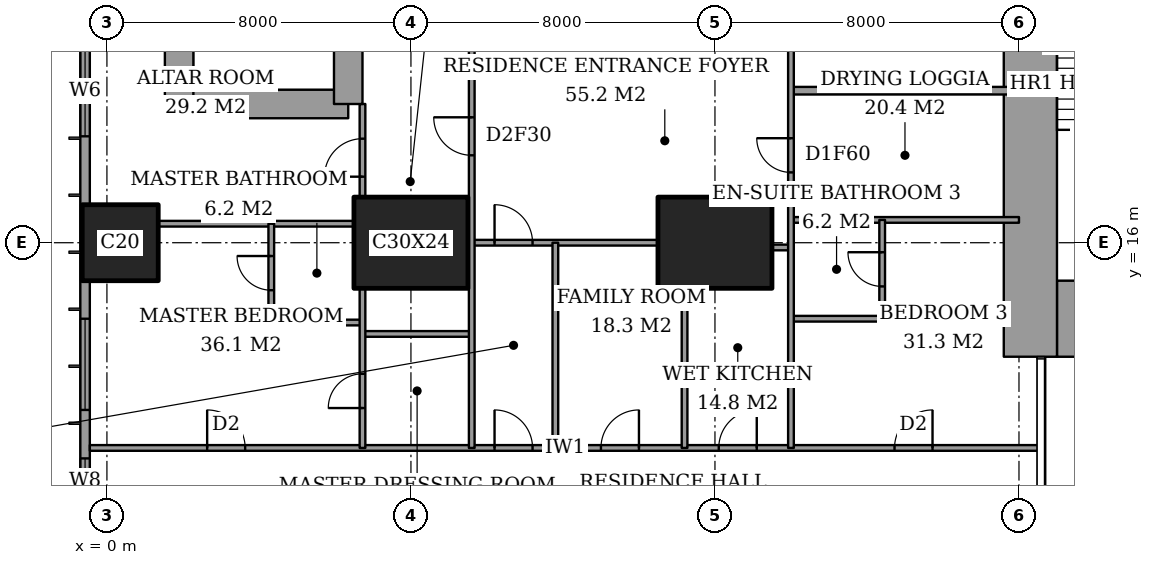
"""IFC4 building model, lengths in metres.
Left out: names, types, materials, properties, quantities, classifications, styles, units other than length and angle.
Written with IfcOpenShell. Run it as: python <this file> out.ifc"""

import sys

from ifc_helpers import new_model, si_unit, direction, frame, frame_2d, origin, origin_2d, place, context, subcontext, project, spatial, rectangle, extrude, element, fill, save


model = new_model("IFC4")
c1 = context("Model", 3, precision=1e-05, world=origin(), true_north=direction((0.0, 1.0)))
c2 = subcontext(c1, "Body", "Model", "MODEL_VIEW")
j1 = project(units=[si_unit("LENGTHUNIT", "METRE"), si_unit("PLANEANGLEUNIT", "RADIAN")], contexts=[c1])
p1 = place(None, origin())
s1 = spatial("IfcSite", under=j1, at=p1, CompositionType="ELEMENT")
p2 = place(p1, origin())
s2 = spatial("IfcBuilding", under=s1, at=p2, CompositionType="ELEMENT")
p3 = place(p2, frame((0.0, 0.0, 83.6)))
s3 = spatial("IfcBuildingStorey", under=s2, at=p3, CompositionType="ELEMENT", Elevation=83.6)
p4 = place(p3, frame((0.35, 16.0, 0.0), z_axis=(0.0, 0.0, 1.0), x_axis=(1.0, 0.0, 0.0)))
e1 = element("IfcColumn", 1, at=p4, inside=s3, PredefinedType="COLUMN", context=c2, shape_type="SweptSolid", body=[
    extrude(rectangle(XDim=2.0, YDim=2.0, at=origin_2d()), origin(), (0.0, 0.0, 1.0), 3.6),
])
for number, where, z_axis, x_axis in (
    (2, (8.0, 16.0, 0.0), (0.0, 0.0, 1.0), (1.0, 0.0, 0.0)),
    (3, (16.0, 16.0, 0.0), (0.0, 0.0, 1.0), (1.0, 0.0, 0.0)),
):
    element("IfcColumn", number, at=place(p3, frame(where, z_axis=z_axis, x_axis=x_axis)), inside=s3, PredefinedType="COLUMN", context=c2, shape_type="SweptSolid", body=[
        extrude(rectangle(XDim=3.0, YDim=2.4, at=origin_2d()), origin(), (0.0, 0.0, 1.0), 3.6),
    ])
p5 = place(p3, frame((25.0, 14.0, 0.0), z_axis=(0.0, 0.0, 1.0), x_axis=(1.0, 0.0, 0.0)))
e4 = element("IfcWall", 4, at=p5, inside=s3, PredefinedType="SHEAR", context=c2, shape_type="SweptSolid", body=[
    extrude(rectangle(XDim=3.15, YDim=2.0, at=frame_2d((1.575, 0.0))), origin(), (0.0, 0.0, 1.0), 3.6),
])
p6 = place(p3, frame((24.3, 13.0, 0.0), z_axis=(0.0, 0.0, 1.0), x_axis=(0.0, 1.0, 0.0)))
e5 = element("IfcWall", 5, at=p6, inside=s3, PredefinedType="SHEAR", context=c2, shape_type="SweptSolid", body=[
    extrude(rectangle(XDim=10.15, YDim=1.4, at=frame_2d((5.075, 0.0))), origin(), (0.0, 0.0, 1.0), 3.6),
])
p7 = place(p3, frame((1.9, 19.65, 0.0), z_axis=(0.0, 0.0, 1.0), x_axis=(1.0, 0.0, 0.0)))
e6 = element("IfcWall", 6, at=p7, inside=s3, PredefinedType="SHEAR", context=c2, shape_type="SweptSolid", body=[
    extrude(rectangle(XDim=4.45, YDim=0.75, at=frame_2d((2.225, 0.0))), origin(), (0.0, 0.0, 1.0), 3.6),
])
p8 = place(p3, frame((6.35, 19.65, 0.0), z_axis=(0.0, 0.0, 1.0), x_axis=(0.0, 1.0, 0.0)))
e7 = element("IfcWall", 7, at=p8, inside=s3, PredefinedType="SHEAR", context=c2, shape_type="SweptSolid", body=[
    extrude(rectangle(XDim=8.7, YDim=0.75, at=frame_2d((4.35, 0.0))), origin(), (0.0, 0.0, 1.0), 3.6),
])
p9 = place(p8, frame((6.725, 0.0, 0.0)))
e8 = element("IfcOpeningElement", 8, at=p9, cuts=e7, PredefinedType="OPENING", context=c2, shape_type="SweptSolid", body=[
    extrude(rectangle(XDim=1.0, YDim=2.1, at=frame_2d((0.5, 1.05))), frame((0.0, 0.385, 0.0), z_axis=(0.0, -1.0, 0.0), x_axis=(1.0, 0.0, 0.0)), (0.0, 0.0, 1.0), 0.77),
])
p10 = place(p3, frame((1.9, 28.35, 0.0), z_axis=(0.0, 0.0, 1.0), x_axis=(0.0, -1.0, 0.0)))
e9 = element("IfcWall", 9, at=p10, inside=s3, PredefinedType="SHEAR", context=c2, shape_type="SweptSolid", body=[
    extrude(rectangle(XDim=8.7, YDim=0.75, at=frame_2d((4.35, 0.0))), origin(), (0.0, 0.0, 1.0), 3.6),
])
p11 = place(p3, frame((-0.575, 44.825, 0.0), z_axis=(0.0, 0.0, 1.0), x_axis=(0.0, -1.0, 0.0)))
e10 = element("IfcWall", 10, at=p11, inside=s3, PredefinedType="SOLIDWALL", context=c2, shape_type="SweptSolid", body=[
    extrude(rectangle(XDim=41.65, YDim=0.25, at=frame_2d((20.825, 0.0))), origin(), (0.0, 0.0, 1.0), 3.6),
])
p12 = place(p11, frame((0.775, 0.0, 0.6)))
e11 = element("IfcOpeningElement", 11, at=p12, cuts=e10, PredefinedType="OPENING", context=c2, shape_type="SweptSolid", body=[
    extrude(rectangle(XDim=2.4, YDim=2.0, at=frame_2d((1.2, 1.0))), frame((0.0, 0.135, 0.0), z_axis=(0.0, -1.0, 0.0), x_axis=(1.0, 0.0, 0.0)), (0.0, 0.0, 1.0), 0.27),
])
p13 = place(p11, frame((6.1, 0.0, 0.6)))
e12 = element("IfcOpeningElement", 12, at=p13, cuts=e10, PredefinedType="OPENING", context=c2, shape_type="SweptSolid", body=[
    extrude(rectangle(XDim=1.2, YDim=2.0, at=frame_2d((0.6, 1.0))), frame((0.0, 0.135, 0.0), z_axis=(0.0, -1.0, 0.0), x_axis=(1.0, 0.0, 0.0)), (0.0, 0.0, 1.0), 0.27),
])
p14 = place(p11, frame((8.425, 0.0, 0.6)))
e13 = element("IfcOpeningElement", 13, at=p14, cuts=e10, PredefinedType="OPENING", context=c2, shape_type="SweptSolid", body=[
    extrude(rectangle(XDim=2.4, YDim=2.0, at=frame_2d((1.2, 1.0))), frame((0.0, 0.135, 0.0), z_axis=(0.0, -1.0, 0.0), x_axis=(1.0, 0.0, 0.0)), (0.0, 0.0, 1.0), 0.27),
])
p15 = place(p11, frame((15.625, 0.0, 0.6)))
e14 = element("IfcOpeningElement", 14, at=p15, cuts=e10, PredefinedType="OPENING", context=c2, shape_type="SweptSolid", body=[
    extrude(rectangle(XDim=2.4, YDim=2.0, at=frame_2d((1.2, 1.0))), frame((0.0, 0.135, 0.0), z_axis=(0.0, -1.0, 0.0), x_axis=(1.0, 0.0, 0.0)), (0.0, 0.0, 1.0), 0.27),
])
p16 = place(p11, frame((23.625, 0.0, 0.6)))
e15 = element("IfcOpeningElement", 15, at=p16, cuts=e10, PredefinedType="OPENING", context=c2, shape_type="SweptSolid", body=[
    extrude(rectangle(XDim=2.4, YDim=2.0, at=frame_2d((1.2, 1.0))), frame((0.0, 0.135, 0.0), z_axis=(0.0, -1.0, 0.0), x_axis=(1.0, 0.0, 0.0)), (0.0, 0.0, 1.0), 0.27),
])
p17 = place(p11, frame((30.825, 0.0, 0.6)))
e16 = element("IfcOpeningElement", 16, at=p17, cuts=e10, PredefinedType="OPENING", context=c2, shape_type="SweptSolid", body=[
    extrude(rectangle(XDim=2.4, YDim=2.0, at=frame_2d((1.2, 1.0))), frame((0.0, 0.135, 0.0), z_axis=(0.0, -1.0, 0.0), x_axis=(1.0, 0.0, 0.0)), (0.0, 0.0, 1.0), 0.27),
])
p18 = place(p11, frame((34.5, 0.0, 0.6)))
e17 = element("IfcOpeningElement", 17, at=p18, cuts=e10, PredefinedType="OPENING", context=c2, shape_type="SweptSolid", body=[
    extrude(rectangle(XDim=1.2, YDim=2.0, at=frame_2d((0.6, 1.0))), frame((0.0, 0.135, 0.0), z_axis=(0.0, -1.0, 0.0), x_axis=(1.0, 0.0, 0.0)), (0.0, 0.0, 1.0), 0.27),
])
p19 = place(p11, frame((38.475, 0.0, 0.6)))
e18 = element("IfcOpeningElement", 18, at=p19, cuts=e10, PredefinedType="OPENING", context=c2, shape_type="SweptSolid", body=[
    extrude(rectangle(XDim=2.4, YDim=2.0, at=frame_2d((1.2, 1.0))), frame((0.0, 0.135, 0.0), z_axis=(0.0, -1.0, 0.0), x_axis=(1.0, 0.0, 0.0)), (0.0, 0.0, 1.0), 0.27),
])
p20 = place(p3, frame((-0.45, 10.6, 0.0), z_axis=(0.0, 0.0, 1.0), x_axis=(1.0, 0.0, 0.0)))
e19 = element("IfcWall", 19, at=p20, inside=s3, PredefinedType="PARTITIONING", context=c2, shape_type="SweptSolid", body=[
    extrude(rectangle(XDim=25.011, YDim=0.15, at=frame_2d((12.505, 0.0))), origin(), (0.0, 0.0, 1.0), 3.35),
])
p21 = place(p20, frame((10.65, 0.0, 0.0)))
e20 = element("IfcOpeningElement", 20, at=p21, cuts=e19, PredefinedType="OPENING", context=c2, shape_type="SweptSolid", body=[
    extrude(rectangle(XDim=1.0, YDim=2.1, at=frame_2d((0.5, 1.05))), frame((0.0, 0.085, 0.0), z_axis=(0.0, -1.0, 0.0), x_axis=(1.0, 0.0, 0.0)), (0.0, 0.0, 1.0), 0.17),
])
p22 = place(p20, frame((3.087, 0.0, 0.0)))
e21 = element("IfcOpeningElement", 21, at=p22, cuts=e19, PredefinedType="OPENING", context=c2, shape_type="SweptSolid", body=[
    extrude(rectangle(XDim=1.0, YDim=2.1, at=frame_2d((0.5, 1.05))), frame((0.0, 0.085, 0.0), z_axis=(0.0, -1.0, 0.0), x_axis=(1.0, 0.0, 0.0)), (0.0, 0.0, 1.0), 0.17),
])
p23 = place(p20, frame((13.45, 0.0, 0.0)))
e22 = element("IfcOpeningElement", 22, at=p23, cuts=e19, PredefinedType="OPENING", context=c2, shape_type="SweptSolid", body=[
    extrude(rectangle(XDim=1.0, YDim=2.1, at=frame_2d((0.5, 1.05))), frame((0.0, 0.085, 0.0), z_axis=(0.0, -1.0, 0.0), x_axis=(1.0, 0.0, 0.0)), (0.0, 0.0, 1.0), 0.17),
])
p24 = place(p20, frame((16.55, 0.0, 0.0)))
e23 = element("IfcOpeningElement", 23, at=p24, cuts=e19, PredefinedType="OPENING", context=c2, shape_type="SweptSolid", body=[
    extrude(rectangle(XDim=1.0, YDim=2.1, at=frame_2d((0.5, 1.05))), frame((0.0, 0.085, 0.0), z_axis=(0.0, -1.0, 0.0), x_axis=(1.0, 0.0, 0.0)), (0.0, 0.0, 1.0), 0.17),
])
p25 = place(p20, frame((21.175, 0.0, 0.0)))
e24 = element("IfcOpeningElement", 24, at=p25, cuts=e19, PredefinedType="OPENING", context=c2, shape_type="SweptSolid", body=[
    extrude(rectangle(XDim=1.0, YDim=2.1, at=frame_2d((0.5, 1.05))), frame((0.0, 0.085, 0.0), z_axis=(0.0, -1.0, 0.0), x_axis=(1.0, 0.0, 0.0)), (0.0, 0.0, 1.0), 0.17),
])
p26 = place(p3, frame((6.725, 13.6, 0.0), z_axis=(0.0, 0.0, 1.0), x_axis=(1.0, 0.0, 0.0)))
e25 = element("IfcWall", 25, at=p26, inside=s3, PredefinedType="PARTITIONING", context=c2, shape_type="SweptSolid", body=[
    extrude(rectangle(XDim=2.875, YDim=0.15, at=frame_2d((1.438, 0.0))), origin(), (0.0, 0.0, 1.0), 3.35),
])
p27 = place(p3, frame((4.325, 13.9, 0.0), z_axis=(0.0, 0.0, 1.0), x_axis=(1.0, 0.0, 0.0)))
e26 = element("IfcWall", 26, at=p27, inside=s3, PredefinedType="PARTITIONING", context=c2, shape_type="SweptSolid", body=[
    extrude(rectangle(XDim=2.4, YDim=0.15, at=frame_2d((1.2, 0.0))), origin(), (0.0, 0.0, 1.0), 3.35),
])
p28 = place(p3, frame((18.0, 14.0, 0.0), z_axis=(0.0, 0.0, 1.0), x_axis=(1.0, 0.0, 0.0)))
e27 = element("IfcWall", 27, at=p28, inside=s3, PredefinedType="PARTITIONING", context=c2, shape_type="SweptSolid", body=[
    extrude(rectangle(XDim=2.4, YDim=0.15, at=frame_2d((1.2, 0.0))), origin(), (0.0, 0.0, 1.0), 3.35),
])
p29 = place(p3, frame((17.5, 15.875, 0.0), z_axis=(0.0, 0.0, 1.0), x_axis=(1.0, 0.0, 0.0)))
e28 = element("IfcWall", 28, at=p29, inside=s3, PredefinedType="PARTITIONING", context=c2, shape_type="SweptSolid", body=[
    extrude(rectangle(XDim=0.5, YDim=0.15, at=frame_2d((0.25, 0.0))), origin(), (0.0, 0.0, 1.0), 2.634),
])
p30 = place(p3, frame((9.6, 16.0, 0.0), z_axis=(0.0, 0.0, 1.0), x_axis=(1.0, 0.0, 0.0)))
e29 = element("IfcWall", 29, at=p30, inside=s3, PredefinedType="PARTITIONING", context=c2, shape_type="SweptSolid", body=[
    extrude(rectangle(XDim=4.9, YDim=0.15, at=frame_2d((2.45, 0.0))), origin(), (0.0, 0.0, 1.0), 2.634),
])
p31 = place(p30, frame((0.6, 0.0, 0.0)))
e30 = element("IfcOpeningElement", 30, at=p31, cuts=e29, PredefinedType="OPENING", context=c2, shape_type="SweptSolid", body=[
    extrude(rectangle(XDim=1.0, YDim=2.1, at=frame_2d((0.5, 1.05))), frame((0.0, 0.085, 0.0), z_axis=(0.0, -1.0, 0.0), x_axis=(1.0, 0.0, 0.0)), (0.0, 0.0, 1.0), 0.17),
])
p32 = place(p3, frame((1.35, 16.5, 0.0), z_axis=(0.0, 0.0, 1.0), x_axis=(1.0, 0.0, 0.0)))
e31 = element("IfcWall", 31, at=p32, inside=s3, PredefinedType="PARTITIONING", context=c2, shape_type="SweptSolid", body=[
    extrude(rectangle(XDim=5.15, YDim=0.15, at=frame_2d((2.575, 0.0))), origin(), (0.0, 0.0, 1.0), 3.35),
])
p33 = place(p3, frame((18.0, 16.6, 0.0), z_axis=(0.0, 0.0, 1.0), x_axis=(1.0, 0.0, 0.0)))
e32 = element("IfcWall", 32, at=p33, inside=s3, PredefinedType="PARTITIONING", context=c2, shape_type="SweptSolid", body=[
    extrude(rectangle(XDim=6.0, YDim=0.15, at=frame_2d((3.0, 0.0))), origin(), (0.0, 0.0, 1.0), 3.35),
])
p34 = place(p3, frame((18.0, 20.0, 0.0), z_axis=(0.0, 0.0, 1.0), x_axis=(1.0, 0.0, 0.0)))
e33 = element("IfcWall", 33, at=p34, inside=s3, PredefinedType="PARTITIONING", context=c2, shape_type="SweptSolid", body=[
    extrude(rectangle(XDim=6.0, YDim=0.2, at=frame_2d((3.0, 0.0))), origin(), (0.0, 0.0, 1.0), 3.35),
])
p35 = place(p3, frame((4.325, 13.9, 0.0), z_axis=(0.0, 0.0, 1.0), x_axis=(0.0, 1.0, 0.0)))
e34 = element("IfcWall", 34, at=p35, inside=s3, PredefinedType="PARTITIONING", context=c2, shape_type="SweptSolid", body=[
    extrude(rectangle(XDim=2.6, YDim=0.15, at=frame_2d((1.3, 0.0))), origin(), (0.0, 0.0, 1.0), 3.35),
])
p36 = place(p35, frame((0.85, 0.0, 0.0)))
e35 = element("IfcOpeningElement", 35, at=p36, cuts=e34, PredefinedType="OPENING", context=c2, shape_type="SweptSolid", body=[
    extrude(rectangle(XDim=0.9, YDim=2.1, at=frame_2d((0.45, 1.05))), frame((0.0, 0.085, 0.0), z_axis=(0.0, -1.0, 0.0), x_axis=(1.0, 0.0, 0.0)), (0.0, 0.0, 1.0), 0.17),
])
p37 = place(p3, frame((6.725, 10.6, 0.0), z_axis=(0.0, 0.0, 1.0), x_axis=(0.0, 1.0, 0.0)))
e36 = element("IfcWall", 36, at=p37, inside=s3, PredefinedType="PARTITIONING", context=c2, shape_type="SweptSolid", body=[
    extrude(rectangle(XDim=4.2, YDim=0.15, at=frame_2d((2.1, 0.0))), origin(), (0.0, 0.0, 1.0), 3.35),
])
p38 = place(p37, frame((1.05, 0.0, 0.0)))
e37 = element("IfcOpeningElement", 37, at=p38, cuts=e36, PredefinedType="OPENING", context=c2, shape_type="SweptSolid", body=[
    extrude(rectangle(XDim=0.9, YDim=2.1, at=frame_2d((0.45, 1.05))), frame((0.0, 0.085, 0.0), z_axis=(0.0, -1.0, 0.0), x_axis=(1.0, 0.0, 0.0)), (0.0, 0.0, 1.0), 0.17),
])
p39 = place(p3, frame((6.725, 17.2, 0.0), z_axis=(0.0, 0.0, 1.0), x_axis=(0.0, 1.0, 0.0)))
e38 = element("IfcWall", 38, at=p39, inside=s3, PredefinedType="PARTITIONING", context=c2, shape_type="SweptSolid", body=[
    extrude(rectangle(XDim=2.45, YDim=0.15, at=frame_2d((1.225, 0.0))), origin(), (0.0, 0.0, 1.0), 3.35),
])
p40 = place(p39, frame((0.538, 0.0, 0.0)))
e39 = element("IfcOpeningElement", 39, at=p40, cuts=e38, PredefinedType="OPENING", context=c2, shape_type="SweptSolid", body=[
    extrude(rectangle(XDim=1.0, YDim=2.1, at=frame_2d((0.5, 1.05))), frame((0.0, 0.085, 0.0), z_axis=(0.0, -1.0, 0.0), x_axis=(1.0, 0.0, 0.0)), (0.0, 0.0, 1.0), 0.17),
])
p41 = place(p3, frame((9.6, 10.6, 0.0), z_axis=(0.0, 0.0, 1.0), x_axis=(0.0, 1.0, 0.0)))
e40 = element("IfcWall", 40, at=p41, inside=s3, PredefinedType="PARTITIONING", context=c2, shape_type="SweptSolid", body=[
    extrude(rectangle(XDim=11.0, YDim=0.15, at=frame_2d((5.5, 0.0))), origin(), (0.0, 0.0, 1.0), 3.35),
])
p42 = place(p41, frame((7.7, 0.0, 0.0)))
e41 = element("IfcOpeningElement", 41, at=p42, cuts=e40, PredefinedType="OPENING", context=c2, shape_type="SweptSolid", body=[
    extrude(rectangle(XDim=1.0, YDim=2.1, at=frame_2d((0.5, 1.05))), frame((0.0, 0.085, 0.0), z_axis=(0.0, -1.0, 0.0), x_axis=(1.0, 0.0, 0.0)), (0.0, 0.0, 1.0), 0.17),
])
p43 = place(p3, frame((11.8, 10.6, 0.0), z_axis=(0.0, 0.0, 1.0), x_axis=(0.0, 1.0, 0.0)))
e42 = element("IfcWall", 42, at=p43, inside=s3, PredefinedType="PARTITIONING", context=c2, shape_type="SweptSolid", body=[
    extrude(rectangle(XDim=5.4, YDim=0.15, at=frame_2d((2.7, 0.0))), origin(), (0.0, 0.0, 1.0), 3.35),
])
p44 = place(p3, frame((15.2, 10.6, 0.0), z_axis=(0.0, 0.0, 1.0), x_axis=(0.0, 1.0, 0.0)))
e43 = element("IfcWall", 43, at=p44, inside=s3, PredefinedType="PARTITIONING", context=c2, shape_type="SweptSolid", body=[
    extrude(rectangle(XDim=4.2, YDim=0.15, at=frame_2d((2.1, 0.0))), origin(), (0.0, 0.0, 1.0), 3.35),
])
p45 = place(p3, frame((18.0, 10.6, 0.0), z_axis=(0.0, 0.0, 1.0), x_axis=(0.0, 1.0, 0.0)))
e44 = element("IfcWall", 44, at=p45, inside=s3, PredefinedType="PARTITIONING", context=c2, shape_type="SweptSolid", body=[
    extrude(rectangle(XDim=13.4, YDim=0.15, at=frame_2d((6.7, 0.0))), origin(), (0.0, 0.0, 1.0), 3.35),
])
p46 = place(p45, frame((10.8, 0.0, 0.0)))
e45 = element("IfcOpeningElement", 45, at=p46, cuts=e44, PredefinedType="OPENING", context=c2, shape_type="SweptSolid", body=[
    extrude(rectangle(XDim=1.2, YDim=2.4, at=frame_2d((0.6, 1.2))), frame((0.0, 0.085, 0.0), z_axis=(0.0, -1.0, 0.0), x_axis=(1.0, 0.0, 0.0)), (0.0, 0.0, 1.0), 0.17),
])
p47 = place(p45, frame((7.25, 0.0, 0.0)))
e46 = element("IfcOpeningElement", 46, at=p47, cuts=e44, PredefinedType="OPENING", context=c2, shape_type="SweptSolid", body=[
    extrude(rectangle(XDim=0.9, YDim=2.1, at=frame_2d((0.45, 1.05))), frame((0.0, 0.085, 0.0), z_axis=(0.0, -1.0, 0.0), x_axis=(1.0, 0.0, 0.0)), (0.0, 0.0, 1.0), 0.17),
])
p48 = place(p3, frame((20.4, 14.0, 0.0), z_axis=(0.0, 0.0, 1.0), x_axis=(0.0, 1.0, 0.0)))
e47 = element("IfcWall", 47, at=p48, inside=s3, PredefinedType="PARTITIONING", context=c2, shape_type="SweptSolid", body=[
    extrude(rectangle(XDim=2.6, YDim=0.15, at=frame_2d((1.3, 0.0))), origin(), (0.0, 0.0, 1.0), 3.35),
])
p49 = place(p48, frame((0.85, 0.0, 0.0)))
e48 = element("IfcOpeningElement", 48, at=p49, cuts=e47, PredefinedType="OPENING", context=c2, shape_type="SweptSolid", body=[
    extrude(rectangle(XDim=0.9, YDim=2.1, at=frame_2d((0.45, 1.05))), frame((0.0, 0.085, 0.0), z_axis=(0.0, -1.0, 0.0), x_axis=(1.0, 0.0, 0.0)), (0.0, 0.0, 1.0), 0.17),
])
p50 = place(p16, origin())
e49 = element("IfcWindow", 49, at=p50, inside=s3, PartitioningType="SINGLE_PANEL", PredefinedType="WINDOW", context=c2, shape_type="SweptSolid", body=[
    extrude(rectangle(XDim=2.4, YDim=2.0, at=frame_2d((1.2, 1.0))), frame((0.0, 0.03, 0.0), z_axis=(0.0, -1.0, 0.0), x_axis=(1.0, 0.0, 0.0)), (0.0, 0.0, 1.0), 0.06),
])
fill(e15, e49)
p51 = place(p17, origin())
e50 = element("IfcWindow", 50, at=p51, inside=s3, PartitioningType="SINGLE_PANEL", PredefinedType="WINDOW", context=c2, shape_type="SweptSolid", body=[
    extrude(rectangle(XDim=2.4, YDim=2.0, at=frame_2d((1.2, 1.0))), frame((0.0, 0.03, 0.0), z_axis=(0.0, -1.0, 0.0), x_axis=(1.0, 0.0, 0.0)), (0.0, 0.0, 1.0), 0.06),
])
fill(e16, e50)
p52 = place(p18, origin())
e51 = element("IfcWindow", 51, at=p52, inside=s3, PartitioningType="SINGLE_PANEL", PredefinedType="WINDOW", context=c2, shape_type="SweptSolid", body=[
    extrude(rectangle(XDim=1.2, YDim=2.0, at=frame_2d((0.6, 1.0))), frame((0.0, 0.03, 0.0), z_axis=(0.0, -1.0, 0.0), x_axis=(1.0, 0.0, 0.0)), (0.0, 0.0, 1.0), 0.06),
])
fill(e17, e51)
p53 = place(p21, origin())
e52 = element("IfcDoor", 52, at=p53, inside=s3, OperationType="SINGLE_SWING_RIGHT", PredefinedType="DOOR", context=c2, shape_type="SweptSolid", body=[
    extrude(rectangle(XDim=1.0, YDim=2.1, at=frame_2d((0.5, 1.05))), frame((0.0, 0.025, 0.0), z_axis=(0.0, -1.0, 0.0), x_axis=(1.0, 0.0, 0.0)), (0.0, 0.0, 1.0), 0.05),
])
fill(e20, e52)
p54 = place(p36, origin())
e53 = element("IfcDoor", 53, at=p54, inside=s3, OperationType="SINGLE_SWING_LEFT", PredefinedType="DOOR", context=c2, shape_type="SweptSolid", body=[
    extrude(rectangle(XDim=0.9, YDim=2.1, at=frame_2d((0.45, 1.05))), frame((0.0, 0.025, 0.0), z_axis=(0.0, -1.0, 0.0), x_axis=(1.0, 0.0, 0.0)), (0.0, 0.0, 1.0), 0.05),
])
fill(e35, e53)
p55 = place(p22, origin())
e54 = element("IfcDoor", 54, at=p55, inside=s3, OperationType="SINGLE_SWING_RIGHT", PredefinedType="DOOR", context=c2, shape_type="SweptSolid", body=[
    extrude(rectangle(XDim=1.0, YDim=2.1, at=frame_2d((0.5, 1.05))), frame((0.0, 0.025, 0.0), z_axis=(0.0, -1.0, 0.0), x_axis=(1.0, 0.0, 0.0)), (0.0, 0.0, 1.0), 0.05),
])
fill(e21, e54)
p56 = place(p40, origin())
e55 = element("IfcDoor", 55, at=p56, inside=s3, OperationType="SINGLE_SWING_RIGHT", PredefinedType="DOOR", context=c2, shape_type="SweptSolid", body=[
    extrude(rectangle(XDim=1.0, YDim=2.1, at=frame_2d((0.5, 1.05))), frame((0.0, 0.025, 0.0), z_axis=(0.0, -1.0, 0.0), x_axis=(1.0, 0.0, 0.0)), (0.0, 0.0, 1.0), 0.05),
])
fill(e39, e55)
p57 = place(p38, origin())
e56 = element("IfcDoor", 56, at=p57, inside=s3, OperationType="SINGLE_SWING_RIGHT", PredefinedType="DOOR", context=c2, shape_type="SweptSolid", body=[
    extrude(rectangle(XDim=0.9, YDim=2.1, at=frame_2d((0.45, 1.05))), frame((0.0, 0.025, 0.0), z_axis=(0.0, -1.0, 0.0), x_axis=(1.0, 0.0, 0.0)), (0.0, 0.0, 1.0), 0.05),
])
fill(e37, e56)
p58 = place(p42, origin())
e57 = element("IfcDoor", 57, at=p58, inside=s3, OperationType="SINGLE_SWING_LEFT", PredefinedType="DOOR", context=c2, shape_type="SweptSolid", body=[
    extrude(rectangle(XDim=1.0, YDim=2.1, at=frame_2d((0.5, 1.05))), frame((0.0, 0.025, 0.0), z_axis=(0.0, -1.0, 0.0), x_axis=(1.0, 0.0, 0.0)), (0.0, 0.0, 1.0), 0.05),
])
fill(e41, e57)
p59 = place(p31, origin())
e58 = element("IfcDoor", 58, at=p59, inside=s3, OperationType="SINGLE_SWING_RIGHT", PredefinedType="DOOR", context=c2, shape_type="SweptSolid", body=[
    extrude(rectangle(XDim=1.0, YDim=2.1, at=frame_2d((0.5, 1.05))), frame((0.0, 0.025, 0.0), z_axis=(0.0, -1.0, 0.0), x_axis=(1.0, 0.0, 0.0)), (0.0, 0.0, 1.0), 0.05),
])
fill(e30, e58)
p60 = place(p23, origin())
e59 = element("IfcDoor", 59, at=p60, inside=s3, OperationType="SINGLE_SWING_LEFT", PredefinedType="DOOR", context=c2, shape_type="SweptSolid", body=[
    extrude(rectangle(XDim=1.0, YDim=2.1, at=frame_2d((0.5, 1.05))), frame((0.0, 0.025, 0.0), z_axis=(0.0, -1.0, 0.0), x_axis=(1.0, 0.0, 0.0)), (0.0, 0.0, 1.0), 0.05),
])
fill(e22, e59)
p61 = place(p24, origin())
e60 = element("IfcDoor", 60, at=p61, inside=s3, OperationType="SINGLE_SWING_LEFT", PredefinedType="DOOR", context=c2, shape_type="SweptSolid", body=[
    extrude(rectangle(XDim=1.0, YDim=2.1, at=frame_2d((0.5, 1.05))), frame((0.0, 0.025, 0.0), z_axis=(0.0, -1.0, 0.0), x_axis=(1.0, 0.0, 0.0)), (0.0, 0.0, 1.0), 0.05),
])
fill(e23, e60)
p62 = place(p49, origin())
e61 = element("IfcDoor", 61, at=p62, inside=s3, OperationType="SINGLE_SWING_LEFT", PredefinedType="DOOR", context=c2, shape_type="SweptSolid", body=[
    extrude(rectangle(XDim=0.9, YDim=2.1, at=frame_2d((0.45, 1.05))), frame((0.0, 0.025, 0.0), z_axis=(0.0, -1.0, 0.0), x_axis=(1.0, 0.0, 0.0)), (0.0, 0.0, 1.0), 0.05),
])
fill(e48, e61)
p63 = place(p25, origin())
e62 = element("IfcDoor", 62, at=p63, inside=s3, OperationType="SINGLE_SWING_LEFT", PredefinedType="DOOR", context=c2, shape_type="SweptSolid", body=[
    extrude(rectangle(XDim=1.0, YDim=2.1, at=frame_2d((0.5, 1.05))), frame((0.0, 0.025, 0.0), z_axis=(0.0, -1.0, 0.0), x_axis=(1.0, 0.0, 0.0)), (0.0, 0.0, 1.0), 0.05),
])
fill(e24, e62)
p64 = place(p47, origin())
e63 = element("IfcDoor", 63, at=p64, inside=s3, OperationType="SINGLE_SWING_LEFT", PredefinedType="DOOR", context=c2, shape_type="SweptSolid", body=[
    extrude(rectangle(XDim=0.9, YDim=2.1, at=frame_2d((0.45, 1.05))), frame((0.0, 0.025, 0.0), z_axis=(0.0, -1.0, 0.0), x_axis=(1.0, 0.0, 0.0)), (0.0, 0.0, 1.0), 0.05),
])
fill(e46, e63)
save(model, sys.argv[1])
